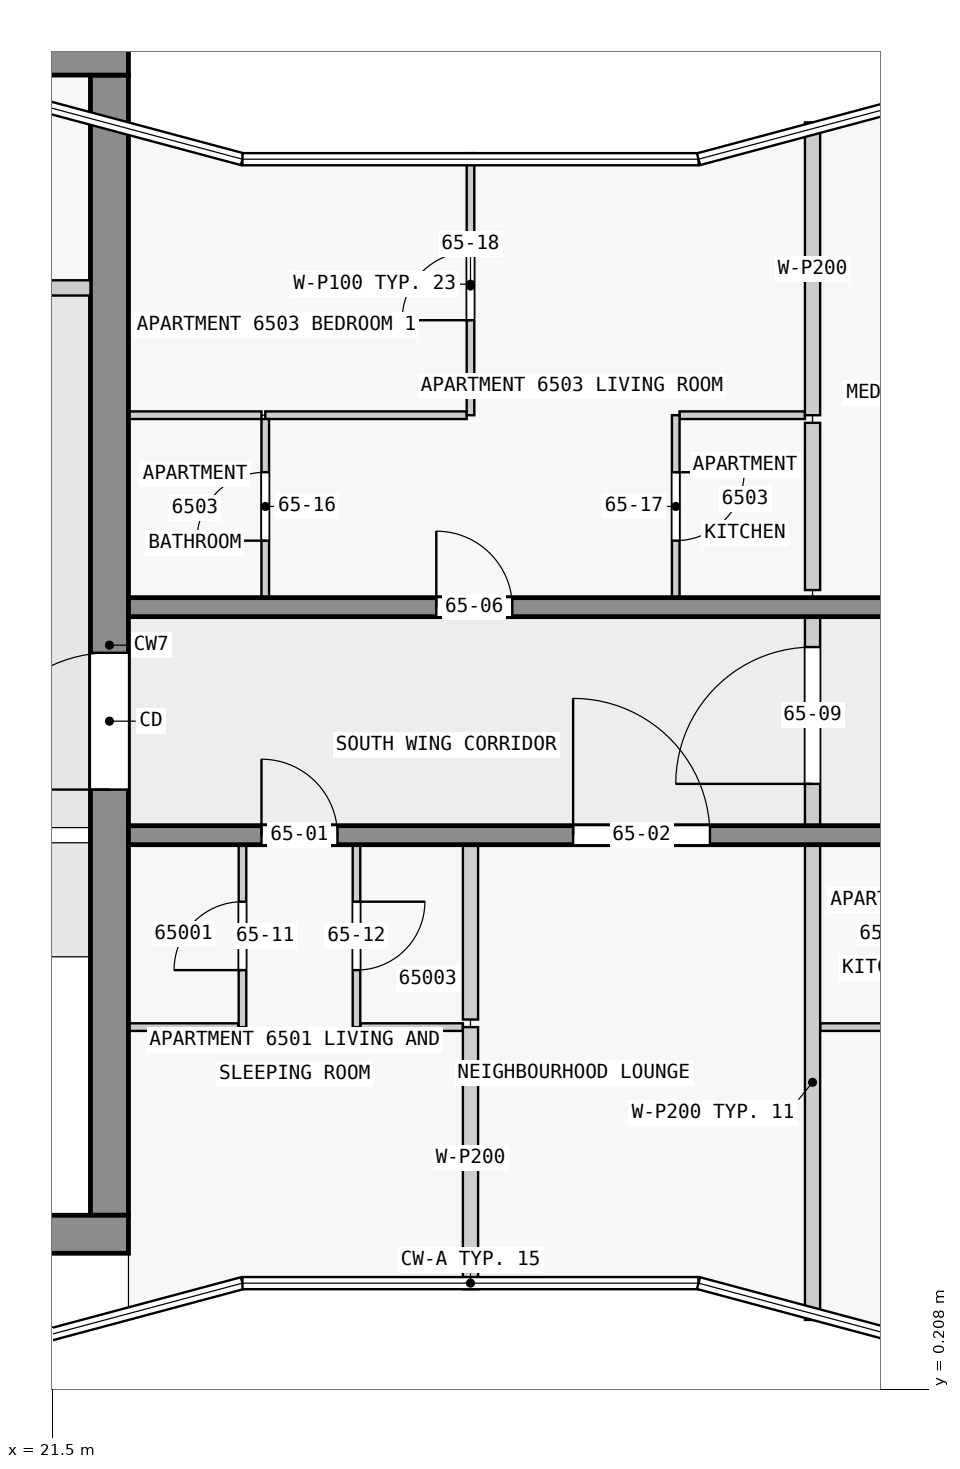
"""IFC4 building model, lengths in metres.
Left out: names, types, materials, properties, quantities, classifications, styles, units other than length and angle.
Written with IfcOpenShell. Run it as: python <this file> out.ifc"""

import sys

from ifc_helpers import new_model, si_unit, direction, frame, frame_2d, origin, place, context, subcontext, project, spatial, rectangle, extrude, element, fill, save


model = new_model("IFC4")
c1 = context("Model", 3, precision=1e-05, world=origin(), true_north=direction((0.0, 1.0)))
c2 = subcontext(c1, "Body", "Model", "MODEL_VIEW")
j1 = project(units=[si_unit("LENGTHUNIT", "METRE"), si_unit("PLANEANGLEUNIT", "RADIAN")], contexts=[c1])
p1 = place(None, origin())
s1 = spatial("IfcSite", under=j1, at=p1, CompositionType="ELEMENT")
p2 = place(p1, origin())
s2 = spatial("IfcBuilding", under=s1, at=p2, CompositionType="ELEMENT")
p3 = place(p2, frame((0.0, 0.0, 249.4)))
s3 = spatial("IfcBuildingStorey", under=s2, at=p3, CompositionType="ELEMENT", Elevation=249.4)
for number, where, z_axis, x_axis in (
    (1, (1.8, 2.25, 0.0), (0.0, 0.0, 1.0), (1.0, 0.0, 0.0)),
    (2, (1.8, 17.75, 0.0), (0.0, 0.0, 1.0), (1.0, 0.0, 0.0)),
):
    element("IfcWall", number, at=place(p3, frame(where, z_axis=z_axis, x_axis=x_axis)), inside=s3, PredefinedType="SHEAR", context=c2, shape_type="SweptSolid", body=[
        extrude(rectangle(XDim=20.7, YDim=0.5, at=frame_2d((10.35, 0.0))), origin(), (0.0, 0.0, 1.0), 3.25),
    ])
p4 = place(p3, frame((22.25, 2.5, 0.0), z_axis=(0.0, 0.0, 1.0), x_axis=(0.0, 1.0, 0.0)))
e3 = element("IfcWall", 3, at=p4, inside=s3, PredefinedType="SHEAR", context=c2, shape_type="SweptSolid", body=[
    extrude(rectangle(XDim=15.0, YDim=0.5, at=frame_2d((7.5, 0.0))), origin(), (0.0, 0.0, 1.0), 3.25),
])
p5 = place(p4, frame((5.6, 0.0, 0.0)))
e4 = element("IfcOpeningElement", 4, at=p5, cuts=e3, PredefinedType="OPENING", context=c2, shape_type="SweptSolid", body=[
    extrude(rectangle(XDim=1.8, YDim=2.1, at=frame_2d((0.9, 1.05))), frame((0.0, 0.26, 0.0), z_axis=(0.0, -1.0, 0.0), x_axis=(1.0, 0.0, 0.0)), (0.0, 0.0, 1.0), 0.52),
])
p6 = place(p3, frame((22.5, 7.5, 0.0), z_axis=(0.0, 0.0, 1.0), x_axis=(1.0, 0.0, 0.0)))
e5 = element("IfcWall", 5, at=p6, inside=s3, PredefinedType="SHEAR", context=c2, shape_type="SweptSolid", body=[
    extrude(rectangle(XDim=22.5, YDim=0.25, at=frame_2d((11.25, 0.0))), origin(), (0.0, 0.0, 1.0), 3.25),
])
p7 = place(p6, frame((1.75, 0.0, 0.0)))
e6 = element("IfcOpeningElement", 6, at=p7, cuts=e5, PredefinedType="OPENING", context=c2, shape_type="SweptSolid", body=[
    extrude(rectangle(XDim=1.0, YDim=2.1, at=frame_2d((0.5, 1.05))), frame((0.0, 0.135, 0.0), z_axis=(0.0, -1.0, 0.0), x_axis=(1.0, 0.0, 0.0)), (0.0, 0.0, 1.0), 0.27),
])
p8 = place(p6, frame((5.85, 0.0, 0.0)))
e7 = element("IfcOpeningElement", 7, at=p8, cuts=e5, PredefinedType="OPENING", context=c2, shape_type="SweptSolid", body=[
    extrude(rectangle(XDim=1.8, YDim=2.1, at=frame_2d((0.9, 1.05))), frame((0.0, 0.135, 0.0), z_axis=(0.0, -1.0, 0.0), x_axis=(1.0, 0.0, 0.0)), (0.0, 0.0, 1.0), 0.27),
])
p9 = place(p6, frame((13.05, 0.0, 0.0)))
e8 = element("IfcOpeningElement", 8, at=p9, cuts=e5, PredefinedType="OPENING", context=c2, shape_type="SweptSolid", body=[
    extrude(rectangle(XDim=1.0, YDim=2.1, at=frame_2d((0.5, 1.05))), frame((0.0, 0.135, 0.0), z_axis=(0.0, -1.0, 0.0), x_axis=(1.0, 0.0, 0.0)), (0.0, 0.0, 1.0), 0.27),
])
p10 = place(p6, frame((18.75, 0.0, 0.0)))
e9 = element("IfcOpeningElement", 9, at=p10, cuts=e5, PredefinedType="OPENING", context=c2, shape_type="SweptSolid", body=[
    extrude(rectangle(XDim=0.9, YDim=2.1, at=frame_2d((0.45, 1.05))), frame((0.0, 0.135, 0.0), z_axis=(0.0, -1.0, 0.0), x_axis=(1.0, 0.0, 0.0)), (0.0, 0.0, 1.0), 0.27),
])
p11 = place(p6, frame((20.95, 0.0, 0.0)))
e10 = element("IfcOpeningElement", 10, at=p11, cuts=e5, PredefinedType="OPENING", context=c2, shape_type="SweptSolid", body=[
    extrude(rectangle(XDim=1.0, YDim=2.1, at=frame_2d((0.5, 1.05))), frame((0.0, 0.135, 0.0), z_axis=(0.0, -1.0, 0.0), x_axis=(1.0, 0.0, 0.0)), (0.0, 0.0, 1.0), 0.27),
])
p12 = place(p3, frame((22.5, 10.5, 0.0), z_axis=(0.0, 0.0, 1.0), x_axis=(1.0, 0.0, 0.0)))
e11 = element("IfcWall", 11, at=p12, inside=s3, PredefinedType="SHEAR", context=c2, shape_type="SweptSolid", body=[
    extrude(rectangle(XDim=22.5, YDim=0.25, at=frame_2d((11.25, 0.0))), origin(), (0.0, 0.0, 1.0), 3.25),
])
p13 = place(p12, frame((4.05, 0.0, 0.0)))
e12 = element("IfcOpeningElement", 12, at=p13, cuts=e11, PredefinedType="OPENING", context=c2, shape_type="SweptSolid", body=[
    extrude(rectangle(XDim=1.0, YDim=2.1, at=frame_2d((0.5, 1.05))), frame((0.0, 0.135, 0.0), z_axis=(0.0, -1.0, 0.0), x_axis=(1.0, 0.0, 0.0)), (0.0, 0.0, 1.0), 0.27),
])
p14 = place(p12, frame((10.75, 0.0, 0.0)))
e13 = element("IfcOpeningElement", 13, at=p14, cuts=e11, PredefinedType="OPENING", context=c2, shape_type="SweptSolid", body=[
    extrude(rectangle(XDim=1.0, YDim=2.1, at=frame_2d((0.5, 1.05))), frame((0.0, 0.135, 0.0), z_axis=(0.0, -1.0, 0.0), x_axis=(1.0, 0.0, 0.0)), (0.0, 0.0, 1.0), 0.27),
])
p15 = place(p12, frame((16.85, 0.0, 0.0)))
e14 = element("IfcOpeningElement", 14, at=p15, cuts=e11, PredefinedType="OPENING", context=c2, shape_type="SweptSolid", body=[
    extrude(rectangle(XDim=1.0, YDim=2.1, at=frame_2d((0.5, 1.05))), frame((0.0, 0.135, 0.0), z_axis=(0.0, -1.0, 0.0), x_axis=(1.0, 0.0, 0.0)), (0.0, 0.0, 1.0), 0.27),
])
p16 = place(p3, frame((18.6, 14.7, 0.0), z_axis=(0.0, 0.0, 1.0), x_axis=(1.0, 0.0, 0.0)))
e15 = element("IfcWall", 15, at=p16, inside=s3, PredefinedType="PARTITIONING", context=c2, shape_type="SweptSolid", body=[
    extrude(rectangle(XDim=3.4, YDim=0.2, at=frame_2d((1.7, 0.0))), origin(), (0.0, 0.0, 1.0), 3.25),
])
p17 = place(p16, frame((0.15, 0.0, 0.0)))
e16 = element("IfcOpeningElement", 16, at=p17, cuts=e15, PredefinedType="OPENING", context=c2, shape_type="SweptSolid", body=[
    extrude(rectangle(XDim=0.9, YDim=2.1, at=frame_2d((0.45, 1.05))), frame((0.0, 0.11, 0.0), z_axis=(0.0, -1.0, 0.0), x_axis=(1.0, 0.0, 0.0)), (0.0, 0.0, 1.0), 0.22),
])
p18 = place(p16, frame((1.85, 0.0, 0.0)))
e17 = element("IfcOpeningElement", 17, at=p18, cuts=e15, PredefinedType="OPENING", context=c2, shape_type="SweptSolid", body=[
    extrude(rectangle(XDim=0.9, YDim=2.1, at=frame_2d((0.45, 1.05))), frame((0.0, 0.11, 0.0), z_axis=(0.0, -1.0, 0.0), x_axis=(1.0, 0.0, 0.0)), (0.0, 0.0, 1.0), 0.22),
])
p19 = place(p3, frame((22.5, 4.975, 0.0), z_axis=(0.0, 0.0, 1.0), x_axis=(1.0, 0.0, 0.0)))
e18 = element("IfcWall", 18, at=p19, inside=s3, PredefinedType="PARTITIONING", context=c2, shape_type="SweptSolid", body=[
    extrude(rectangle(XDim=1.45, YDim=0.1, at=frame_2d((0.725, 0.0))), origin(), (0.0, 0.0, 1.0), 3.25),
])
p20 = place(p3, frame((25.55, 4.975, 0.0), z_axis=(0.0, 0.0, 1.0), x_axis=(1.0, 0.0, 0.0)))
e19 = element("IfcWall", 19, at=p20, inside=s3, PredefinedType="PARTITIONING", context=c2, shape_type="SweptSolid", body=[
    extrude(rectangle(XDim=1.35, YDim=0.1, at=frame_2d((0.675, 0.0))), origin(), (0.0, 0.0, 1.0), 3.25),
])
p21 = place(p3, frame((31.6, 4.975, 0.0), z_axis=(0.0, 0.0, 1.0), x_axis=(1.0, 0.0, 0.0)))
e20 = element("IfcWall", 20, at=p21, inside=s3, PredefinedType="PARTITIONING", context=c2, shape_type="SweptSolid", body=[
    extrude(rectangle(XDim=1.65, YDim=0.1, at=frame_2d((0.825, 0.0))), origin(), (0.0, 0.0, 1.0), 3.25),
])
p22 = place(p3, frame((24.25, 13.025, 0.0), z_axis=(0.0, 0.0, 1.0), x_axis=(-1.0, 0.0, 0.0)))
e21 = element("IfcWall", 21, at=p22, inside=s3, PredefinedType="PARTITIONING", context=c2, shape_type="SweptSolid", body=[
    extrude(rectangle(XDim=1.75, YDim=0.1, at=frame_2d((0.875, 0.0))), origin(), (0.0, 0.0, 1.0), 3.25),
])
p23 = place(p3, frame((31.4, 13.025, 0.0), z_axis=(0.0, 0.0, 1.0), x_axis=(-1.0, 0.0, 0.0)))
e22 = element("IfcWall", 22, at=p23, inside=s3, PredefinedType="PARTITIONING", context=c2, shape_type="SweptSolid", body=[
    extrude(rectangle(XDim=1.65, YDim=0.1, at=frame_2d((0.825, 0.0))), origin(), (0.0, 0.0, 1.0), 3.25),
])
p24 = place(p3, frame((24.3, 13.025, 0.0), z_axis=(0.0, 0.0, 1.0), x_axis=(1.0, 0.0, 0.0)))
e23 = element("IfcWall", 23, at=p24, inside=s3, PredefinedType="PARTITIONING", context=c2, shape_type="SweptSolid", body=[
    extrude(rectangle(XDim=2.65, YDim=0.1, at=frame_2d((1.325, 0.0))), origin(), (0.0, 0.0, 1.0), 3.25),
])
p25 = place(p3, frame((24.0, 4.975, 0.0), z_axis=(0.0, 0.0, 1.0), x_axis=(0.0, 1.0, 0.0)))
e24 = element("IfcWall", 24, at=p25, inside=s3, PredefinedType="PARTITIONING", context=c2, shape_type="SweptSolid", body=[
    extrude(rectangle(XDim=2.4, YDim=0.1, at=frame_2d((1.2, 0.0))), origin(), (0.0, 0.0, 1.0), 3.25),
])
p26 = place(p25, frame((0.75, 0.0, 0.0)))
e25 = element("IfcOpeningElement", 25, at=p26, cuts=e24, PredefinedType="OPENING", context=c2, shape_type="SweptSolid", body=[
    extrude(rectangle(XDim=0.9, YDim=2.1, at=frame_2d((0.45, 1.05))), frame((0.0, 0.06, 0.0), z_axis=(0.0, -1.0, 0.0), x_axis=(1.0, 0.0, 0.0)), (0.0, 0.0, 1.0), 0.12),
])
p27 = place(p3, frame((24.3, 10.625, 0.0), z_axis=(0.0, 0.0, 1.0), x_axis=(0.0, 1.0, 0.0)))
e26 = element("IfcWall", 26, at=p27, inside=s3, PredefinedType="PARTITIONING", context=c2, shape_type="SweptSolid", body=[
    extrude(rectangle(XDim=2.35, YDim=0.1, at=frame_2d((1.175, 0.0))), origin(), (0.0, 0.0, 1.0), 3.25),
])
p28 = place(p27, frame((0.75, 0.0, 0.0)))
e27 = element("IfcOpeningElement", 27, at=p28, cuts=e26, PredefinedType="OPENING", context=c2, shape_type="SweptSolid", body=[
    extrude(rectangle(XDim=0.9, YDim=2.1, at=frame_2d((0.45, 1.05))), frame((0.0, 0.06, 0.0), z_axis=(0.0, -1.0, 0.0), x_axis=(1.0, 0.0, 0.0)), (0.0, 0.0, 1.0), 0.12),
])
p29 = place(p3, frame((25.5, 7.375, 0.0), z_axis=(0.0, 0.0, 1.0), x_axis=(0.0, -1.0, 0.0)))
e28 = element("IfcWall", 28, at=p29, inside=s3, PredefinedType="PARTITIONING", context=c2, shape_type="SweptSolid", body=[
    extrude(rectangle(XDim=2.4, YDim=0.1, at=frame_2d((1.2, 0.0))), origin(), (0.0, 0.0, 1.0), 3.25),
])
p30 = place(p29, frame((0.75, 0.0, 0.0)))
e29 = element("IfcOpeningElement", 29, at=p30, cuts=e28, PredefinedType="OPENING", context=c2, shape_type="SweptSolid", body=[
    extrude(rectangle(XDim=0.9, YDim=2.1, at=frame_2d((0.45, 1.05))), frame((0.0, 0.06, 0.0), z_axis=(0.0, -1.0, 0.0), x_axis=(1.0, 0.0, 0.0)), (0.0, 0.0, 1.0), 0.12),
])
p31 = place(p3, frame((27.0, 13.025, 0.0), z_axis=(0.0, 0.0, 1.0), x_axis=(0.0, 1.0, 0.0)))
e30 = element("IfcWall", 30, at=p31, inside=s3, PredefinedType="PARTITIONING", context=c2, shape_type="SweptSolid", body=[
    extrude(rectangle(XDim=3.448, YDim=0.1, at=frame_2d((1.724, 0.0))), origin(), (0.0, 0.0, 1.0), 3.25),
])
p32 = place(p31, frame((1.25, 0.0, 0.0)))
e31 = element("IfcOpeningElement", 31, at=p32, cuts=e30, PredefinedType="OPENING", context=c2, shape_type="SweptSolid", body=[
    extrude(rectangle(XDim=0.9, YDim=2.1, at=frame_2d((0.45, 1.05))), frame((0.0, 0.06, 0.0), z_axis=(0.0, -1.0, 0.0), x_axis=(1.0, 0.0, 0.0)), (0.0, 0.0, 1.0), 0.12),
])
p33 = place(p3, frame((27.0, 4.975, 0.0), z_axis=(0.0, 0.0, 1.0), x_axis=(0.0, -1.0, 0.0)))
e32 = element("IfcWall", 32, at=p33, inside=s3, PredefinedType="PARTITIONING", context=c2, shape_type="SweptSolid", body=[
    extrude(rectangle(XDim=3.448, YDim=0.2, at=frame_2d((1.724, 0.0))), origin(), (0.0, 0.0, 1.0), 3.25),
])
p34 = place(p3, frame((27.0, 5.075, 0.0), z_axis=(0.0, 0.0, 1.0), x_axis=(0.0, 1.0, 0.0)))
e33 = element("IfcWall", 33, at=p34, inside=s3, PredefinedType="PARTITIONING", context=c2, shape_type="SweptSolid", body=[
    extrude(rectangle(XDim=2.3, YDim=0.2, at=frame_2d((1.15, 0.0))), origin(), (0.0, 0.0, 1.0), 3.25),
])
p35 = place(p3, frame((29.7, 13.025, 0.0), z_axis=(0.0, 0.0, 1.0), x_axis=(0.0, -1.0, 0.0)))
e34 = element("IfcWall", 34, at=p35, inside=s3, PredefinedType="PARTITIONING", context=c2, shape_type="SweptSolid", body=[
    extrude(rectangle(XDim=2.4, YDim=0.1, at=frame_2d((1.2, 0.0))), origin(), (0.0, 0.0, 1.0), 3.25),
])
p36 = place(p35, frame((0.75, 0.0, 0.0)))
e35 = element("IfcOpeningElement", 35, at=p36, cuts=e34, PredefinedType="OPENING", context=c2, shape_type="SweptSolid", body=[
    extrude(rectangle(XDim=0.9, YDim=2.1, at=frame_2d((0.45, 1.05))), frame((0.0, 0.06, 0.0), z_axis=(0.0, -1.0, 0.0), x_axis=(1.0, 0.0, 0.0)), (0.0, 0.0, 1.0), 0.12),
])
p37 = place(p3, frame((31.5, 16.878, 0.0), z_axis=(0.0, 0.0, 1.0), x_axis=(0.0, -1.0, 0.0)))
e36 = element("IfcWall", 36, at=p37, inside=s3, PredefinedType="PARTITIONING", context=c2, shape_type="SweptSolid", body=[
    extrude(rectangle(XDim=3.853, YDim=0.2, at=frame_2d((1.926, 0.0))), origin(), (0.0, 0.0, 1.0), 3.25),
])
p38 = place(p3, frame((31.5, 1.122, 0.0), z_axis=(0.0, 0.0, 1.0), x_axis=(0.0, 1.0, 0.0)))
e37 = element("IfcWall", 37, at=p38, inside=s3, PredefinedType="PARTITIONING", context=c2, shape_type="SweptSolid", body=[
    extrude(rectangle(XDim=6.253, YDim=0.2, at=frame_2d((3.126, 0.0))), origin(), (0.0, 0.0, 1.0), 3.25),
])
p39 = place(p3, frame((31.5, 10.725, 0.0), z_axis=(0.0, 0.0, 1.0), x_axis=(0.0, 1.0, 0.0)))
e38 = element("IfcWall", 38, at=p39, inside=s3, PredefinedType="PARTITIONING", context=c2, shape_type="SweptSolid", body=[
    extrude(rectangle(XDim=2.2, YDim=0.2, at=frame_2d((1.1, 0.0))), origin(), (0.0, 0.0, 1.0), 3.25),
])
p40 = place(p3, frame((31.5, 7.475, 0.0), z_axis=(0.0, 0.0, 1.0), x_axis=(0.0, 1.0, 0.0)))
e39 = element("IfcWall", 39, at=p40, inside=s3, PredefinedType="PARTITIONING", context=c2, shape_type="SweptSolid", body=[
    extrude(rectangle(XDim=3.15, YDim=0.2, at=frame_2d((1.575, 0.0))), origin(), (0.0, 0.0, 1.0), 3.25),
])
p41 = place(p40, frame((0.7, 0.0, 0.0)))
e40 = element("IfcOpeningElement", 40, at=p41, cuts=e39, PredefinedType="OPENING", context=c2, shape_type="SweptSolid", body=[
    extrude(rectangle(XDim=1.8, YDim=2.1, at=frame_2d((0.9, 1.05))), frame((0.0, 0.11, 0.0), z_axis=(0.0, -1.0, 0.0), x_axis=(1.0, 0.0, 0.0)), (0.0, 0.0, 1.0), 0.22),
])
p42 = place(p5, origin())
e41 = element("IfcDoor", 41, at=p42, inside=s3, OperationType="DOUBLE_DOOR_SINGLE_SWING", PredefinedType="DOOR", context=c2, shape_type="SweptSolid", body=[
    extrude(rectangle(XDim=1.8, YDim=2.1, at=frame_2d((0.9, 1.05))), frame((0.0, 0.025, 0.0), z_axis=(0.0, -1.0, 0.0), x_axis=(1.0, 0.0, 0.0)), (0.0, 0.0, 1.0), 0.05),
])
fill(e4, e41)
p43 = place(p7, origin())
e42 = element("IfcDoor", 42, at=p43, inside=s3, OperationType="SINGLE_SWING_LEFT", PredefinedType="DOOR", context=c2, shape_type="SweptSolid", body=[
    extrude(rectangle(XDim=1.0, YDim=2.1, at=frame_2d((0.5, 1.05))), frame((0.0, 0.025, 0.0), z_axis=(0.0, -1.0, 0.0), x_axis=(1.0, 0.0, 0.0)), (0.0, 0.0, 1.0), 0.05),
])
fill(e6, e42)
p44 = place(p8, origin())
e43 = element("IfcDoor", 43, at=p44, inside=s3, OperationType="SINGLE_SWING_LEFT", PredefinedType="DOOR", context=c2, shape_type="SweptSolid", body=[
    extrude(rectangle(XDim=1.8, YDim=2.1, at=frame_2d((0.9, 1.05))), frame((0.0, 0.025, 0.0), z_axis=(0.0, -1.0, 0.0), x_axis=(1.0, 0.0, 0.0)), (0.0, 0.0, 1.0), 0.05),
])
fill(e7, e43)
p45 = place(p13, origin())
e44 = element("IfcDoor", 44, at=p45, inside=s3, OperationType="SINGLE_SWING_LEFT", PredefinedType="DOOR", context=c2, shape_type="SweptSolid", body=[
    extrude(rectangle(XDim=1.0, YDim=2.1, at=frame_2d((0.5, 1.05))), frame((0.0, 0.025, 0.0), z_axis=(0.0, -1.0, 0.0), x_axis=(1.0, 0.0, 0.0)), (0.0, 0.0, 1.0), 0.05),
])
fill(e12, e44)
p46 = place(p41, origin())
e45 = element("IfcDoor", 45, at=p46, inside=s3, OperationType="SINGLE_SWING_RIGHT", PredefinedType="DOOR", context=c2, shape_type="SweptSolid", body=[
    extrude(rectangle(XDim=1.8, YDim=2.1, at=frame_2d((0.9, 1.05))), frame((0.0, 0.025, 0.0), z_axis=(0.0, -1.0, 0.0), x_axis=(1.0, 0.0, 0.0)), (0.0, 0.0, 1.0), 0.05),
])
fill(e40, e45)
p47 = place(p26, origin())
e46 = element("IfcDoor", 46, at=p47, inside=s3, OperationType="SINGLE_SWING_LEFT", PredefinedType="DOOR", context=c2, shape_type="SweptSolid", body=[
    extrude(rectangle(XDim=0.9, YDim=2.1, at=frame_2d((0.45, 1.05))), frame((0.0, 0.025, 0.0), z_axis=(0.0, -1.0, 0.0), x_axis=(1.0, 0.0, 0.0)), (0.0, 0.0, 1.0), 0.05),
])
fill(e25, e46)
p48 = place(p30, origin())
e47 = element("IfcDoor", 47, at=p48, inside=s3, OperationType="SINGLE_SWING_LEFT", PredefinedType="DOOR", context=c2, shape_type="SweptSolid", body=[
    extrude(rectangle(XDim=0.9, YDim=2.1, at=frame_2d((0.45, 1.05))), frame((0.0, 0.025, 0.0), z_axis=(0.0, -1.0, 0.0), x_axis=(1.0, 0.0, 0.0)), (0.0, 0.0, 1.0), 0.05),
])
fill(e29, e47)
p49 = place(p28, origin())
e48 = element("IfcDoor", 48, at=p49, inside=s3, OperationType="SINGLE_SWING_RIGHT", PredefinedType="DOOR", context=c2, shape_type="SweptSolid", body=[
    extrude(rectangle(XDim=0.9, YDim=2.1, at=frame_2d((0.45, 1.05))), frame((0.0, 0.025, 0.0), z_axis=(0.0, -1.0, 0.0), x_axis=(1.0, 0.0, 0.0)), (0.0, 0.0, 1.0), 0.05),
])
fill(e27, e48)
p50 = place(p36, origin())
e49 = element("IfcDoor", 49, at=p50, inside=s3, OperationType="SINGLE_SWING_LEFT", PredefinedType="DOOR", context=c2, shape_type="SweptSolid", body=[
    extrude(rectangle(XDim=0.9, YDim=2.1, at=frame_2d((0.45, 1.05))), frame((0.0, 0.025, 0.0), z_axis=(0.0, -1.0, 0.0), x_axis=(1.0, 0.0, 0.0)), (0.0, 0.0, 1.0), 0.05),
])
fill(e35, e49)
p51 = place(p32, origin())
e50 = element("IfcDoor", 50, at=p51, inside=s3, OperationType="SINGLE_SWING_LEFT", PredefinedType="DOOR", context=c2, shape_type="SweptSolid", body=[
    extrude(rectangle(XDim=0.9, YDim=2.1, at=frame_2d((0.45, 1.05))), frame((0.0, 0.025, 0.0), z_axis=(0.0, -1.0, 0.0), x_axis=(1.0, 0.0, 0.0)), (0.0, 0.0, 1.0), 0.05),
])
fill(e31, e50)
save(model, sys.argv[1])
